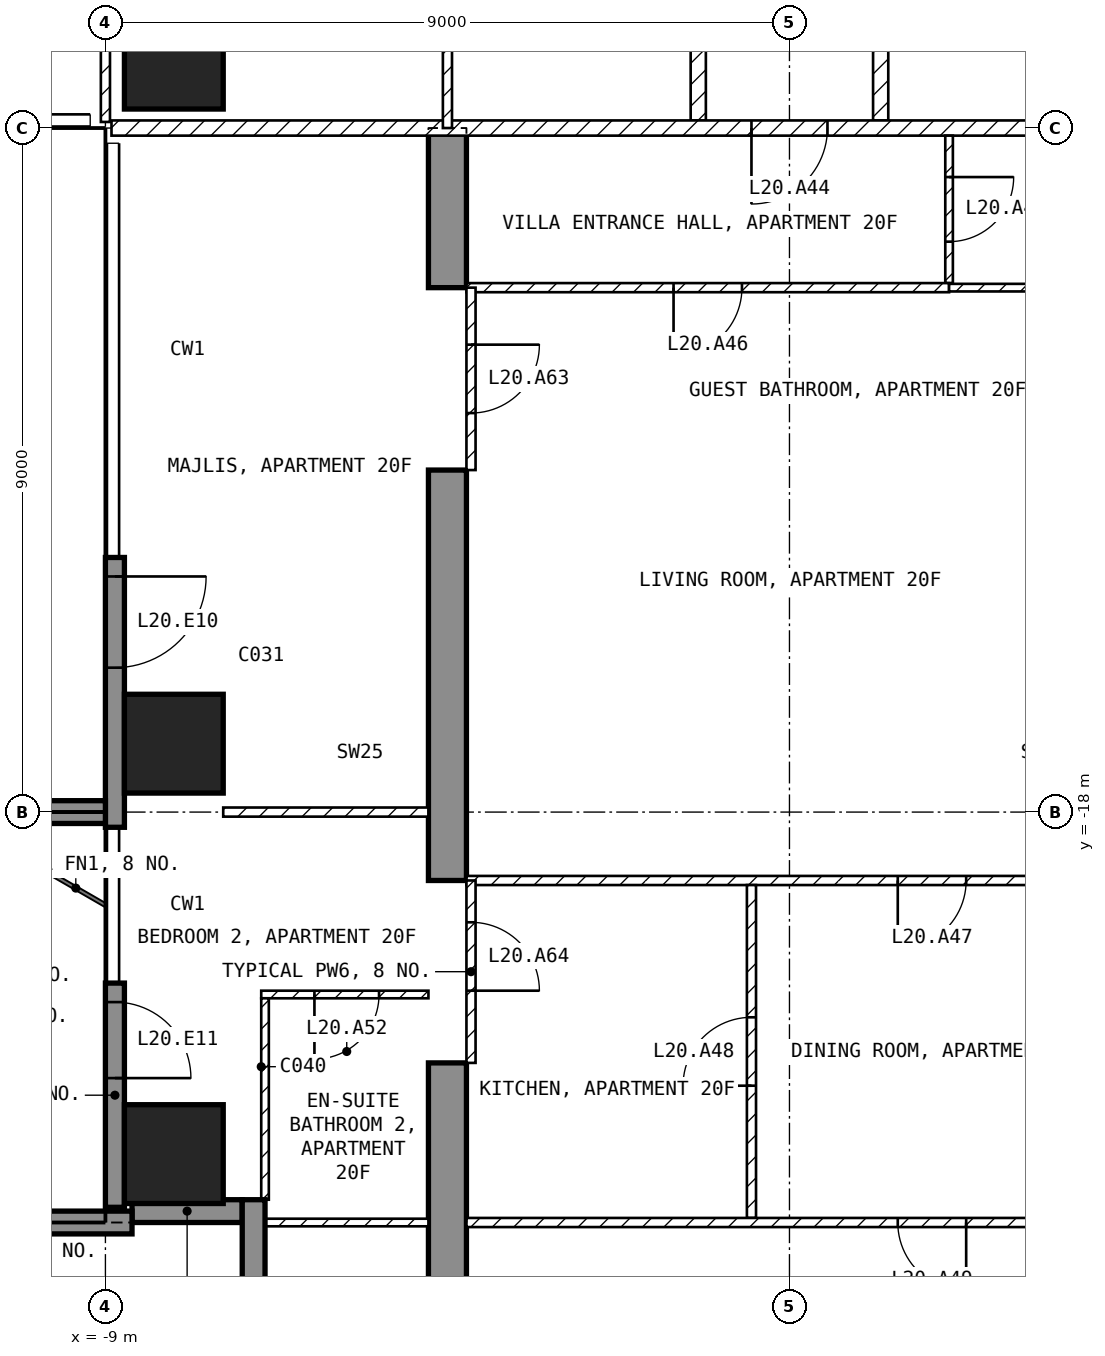
"""IFC4 building model, lengths in metres.
Left out: names, types, materials, properties, quantities, classifications, styles, units other than length and angle.
Written with IfcOpenShell. Run it as: python <this file> out.ifc"""

import sys

from ifc_helpers import new_model, si_unit, direction, frame, frame_2d, origin, origin_2d, place, context, subcontext, project, spatial, polyline, rectangle, outline, extrude, element, fill, save


model = new_model("IFC4")
c1 = context("Model", 3, precision=1e-05, world=origin(), true_north=direction((0.0, 1.0)))
c2 = subcontext(c1, "Body", "Model", "MODEL_VIEW")
j1 = project(units=[si_unit("LENGTHUNIT", "METRE"), si_unit("PLANEANGLEUNIT", "RADIAN")], contexts=[c1])
p1 = place(None, origin())
s1 = spatial("IfcSite", under=j1, at=p1, CompositionType="ELEMENT")
p2 = place(p1, origin())
s2 = spatial("IfcBuilding", under=s1, at=p2, CompositionType="ELEMENT")
p3 = place(p2, frame((0.0, 0.0, 89.0)))
s3 = spatial("IfcBuildingStorey", under=s2, at=p3, CompositionType="ELEMENT", Elevation=89.0)
for number, where, z_axis, x_axis in (
    (1, (-8.1, -22.5, -0.25), (0.0, 0.0, 1.0), (1.0, 0.0, 0.0)),
    (2, (-8.1, -17.1, -0.25), (0.0, 0.0, 1.0), (1.0, 0.0, 0.0)),
    (3, (-8.1, -8.1, -0.25), (0.0, 0.0, 1.0), (1.0, 0.0, 0.0)),
):
    element("IfcColumn", number, at=place(p3, frame(where, z_axis=z_axis, x_axis=x_axis)), inside=s3, PredefinedType="COLUMN", context=c2, shape_type="SweptSolid", body=[
        extrude(rectangle(XDim=1.3, YDim=1.3, at=origin_2d()), origin(), (0.0, 0.0, 1.0), 3.45),
    ])
p4 = place(p3, frame((-4.75, -25.45, -0.25), z_axis=(1.0, 0.0, 0.0), x_axis=(0.0, 1.0, 0.0)))
e4 = element("IfcWall", 4, at=p4, inside=s3, PredefinedType="SHEAR", context=c2, shape_type="SweptSolid", body=[
    extrude(outline(polyline([(0.0, 0.0), (4.15, 0.0), (4.15, 2.65), (6.55, 2.65), (6.55, 0.0), (11.95, 0.0), (11.95, 2.65), (14.35, 2.65), (14.35, 0.0), (16.45, 0.0), (16.45, 3.45), (0.0, 3.45), (0.0, 0.0)])), origin(), (0.0, 0.0, 1.0), 0.5),
])
p5 = place(p3, frame((-8.875, -14.65, 0.0), z_axis=(0.0, 0.0, 1.0), x_axis=(0.0, -1.0, 0.0)))
e5 = element("IfcWall", 5, at=p5, inside=s3, PredefinedType="SOLIDWALL", context=c2, shape_type="SweptSolid", body=[
    extrude(rectangle(XDim=3.55, YDim=0.25, at=frame_2d((1.775, 0.0))), origin(), (0.0, 0.0, 1.0), 3.2),
])
p6 = place(p5, frame((0.25, 0.0, 0.0)))
e6 = element("IfcOpeningElement", 6, at=p6, cuts=e5, PredefinedType="OPENING", context=c2, shape_type="SweptSolid", body=[
    extrude(rectangle(XDim=1.2, YDim=2.4, at=frame_2d((0.6, 1.2))), frame((0.0, 0.135, 0.0), z_axis=(0.0, -1.0, 0.0), x_axis=(1.0, 0.0, 0.0)), (0.0, 0.0, 1.0), 0.27),
])
p7 = place(p3, frame((-8.875, -20.25, 0.0), z_axis=(0.0, 0.0, 1.0), x_axis=(0.0, -1.0, 0.0)))
e7 = element("IfcWall", 7, at=p7, inside=s3, PredefinedType="SOLIDWALL", context=c2, shape_type="SweptSolid", body=[
    extrude(rectangle(XDim=2.95, YDim=0.25, at=frame_2d((1.475, 0.0))), origin(), (0.0, 0.0, 1.0), 3.2),
])
p8 = place(p7, frame((0.25, 0.0, 0.0)))
e8 = element("IfcOpeningElement", 8, at=p8, cuts=e7, PredefinedType="OPENING", context=c2, shape_type="SweptSolid", body=[
    extrude(rectangle(XDim=1.0, YDim=2.4, at=frame_2d((0.5, 1.2))), frame((0.0, 0.135, 0.0), z_axis=(0.0, -1.0, 0.0), x_axis=(1.0, 0.0, 0.0)), (0.0, 0.0, 1.0), 0.27),
])
p9 = place(p3, frame((-8.65, -23.25, 0.0), z_axis=(0.0, 0.0, 1.0), x_axis=(1.0, 0.0, 0.0)))
e9 = element("IfcWall", 9, at=p9, inside=s3, PredefinedType="SOLIDWALL", context=c2, shape_type="SweptSolid", body=[
    extrude(rectangle(XDim=1.45, YDim=0.3, at=frame_2d((0.725, 0.0))), origin(), (0.0, 0.0, 1.0), 3.2),
])
p10 = place(p3, frame((-7.05, -23.1, 0.0), z_axis=(0.0, 0.0, 1.0), x_axis=(0.0, -1.0, 0.0)))
e10 = element("IfcWall", 10, at=p10, inside=s3, PredefinedType="SOLIDWALL", context=c2, shape_type="SweptSolid", body=[
    extrude(rectangle(XDim=1.8, YDim=0.3, at=frame_2d((0.9, 0.0))), origin(), (0.0, 0.0, 1.0), 3.2),
])
p11 = place(p3, frame((-8.65, -23.4, 0.0), z_axis=(0.0, 0.0, 1.0), x_axis=(-1.0, 0.0, 0.0)))
e11 = element("IfcWall", 11, at=p11, inside=s3, PredefinedType="SOLIDWALL", context=c2, shape_type="SweptSolid", body=[
    extrude(rectangle(XDim=3.05, YDim=0.3, at=frame_2d((1.525, 0.0))), origin(), (0.0, 0.0, 1.0), 3.2),
])
p12 = place(p3, frame((-9.0, -18.0, 0.0), z_axis=(0.0, 0.0, 1.0), x_axis=(-1.0, 0.0, 0.0)))
e12 = element("IfcWall", 12, at=p12, inside=s3, PredefinedType="SOLIDWALL", context=c2, shape_type="SweptSolid", body=[
    extrude(rectangle(XDim=2.7, YDim=0.3, at=frame_2d((1.35, 0.0))), origin(), (0.0, 0.0, 1.0), 3.2),
])
for number, where, z_axis, x_axis in (
    (13, (1.2, -1.3, 0.0), (0.0, 0.0, 1.0), (0.0, -1.0, 0.0)),
    (14, (-1.2, -8.9, 0.0), (0.0, 0.0, 1.0), (0.0, 1.0, 0.0)),
):
    element("IfcWall", number, at=place(p3, frame(where, z_axis=z_axis, x_axis=x_axis)), inside=s3, PredefinedType="PARTITIONING", context=c2, shape_type="SweptSolid", body=[
        extrude(rectangle(XDim=7.6, YDim=0.2, at=frame_2d((3.8, 0.0))), origin(), (0.0, 0.0, 1.0), 3.2),
    ])
p13 = place(p3, frame((8.92, -9.0, 0.0), z_axis=(0.0, 0.0, 1.0), x_axis=(-1.0, 0.0, 0.0)))
e15 = element("IfcWall", 15, at=p13, inside=s3, PredefinedType="PARTITIONING", context=c2, shape_type="SweptSolid", body=[
    extrude(rectangle(XDim=17.84, YDim=0.2, at=frame_2d((8.92, 0.0))), origin(), (0.0, 0.0, 1.0), 3.2),
])
p14 = place(p13, frame((8.42, 0.0, 0.0)))
e16 = element("IfcOpeningElement", 16, at=p14, cuts=e15, PredefinedType="OPENING", context=c2, shape_type="SweptSolid", body=[
    extrude(rectangle(XDim=1.0, YDim=2.1, at=frame_2d((0.5, 1.05))), frame((0.0, 0.11, 0.0), z_axis=(0.0, -1.0, 0.0), x_axis=(1.0, 0.0, 0.0)), (0.0, 0.0, 1.0), 0.22),
])
p15 = place(p3, frame((-9.0, -1.3, 0.0), z_axis=(0.0, 0.0, 1.0), x_axis=(0.0, -1.0, 0.0)))
e17 = element("IfcWall", 17, at=p15, inside=s3, PredefinedType="PARTITIONING", context=c2, shape_type="SweptSolid", body=[
    extrude(rectangle(XDim=7.62, YDim=0.12, at=frame_2d((3.81, 0.0))), origin(), (0.0, 0.0, 1.0), 3.2),
])
p16 = place(p15, frame((4.17, 0.0, 0.0)))
e18 = element("IfcOpeningElement", 18, at=p16, cuts=e17, PredefinedType="OPENING", context=c2, shape_type="SweptSolid", body=[
    extrude(rectangle(XDim=0.9, YDim=2.1, at=frame_2d((0.45, 1.05))), frame((0.0, 0.07, 0.0), z_axis=(0.0, -1.0, 0.0), x_axis=(1.0, 0.0, 0.0)), (0.0, 0.0, 1.0), 0.14),
])
p17 = place(p3, frame((-4.5, -1.3, 0.0), z_axis=(0.0, 0.0, 1.0), x_axis=(0.0, -1.0, 0.0)))
e19 = element("IfcWall", 19, at=p17, inside=s3, PredefinedType="PARTITIONING", context=c2, shape_type="SweptSolid", body=[
    extrude(rectangle(XDim=7.7, YDim=0.12, at=frame_2d((3.85, 0.0))), origin(), (0.0, 0.0, 1.0), 3.2),
])
p18 = place(p17, frame((4.988, 0.0, 0.0)))
e20 = element("IfcOpeningElement", 20, at=p18, cuts=e19, PredefinedType="OPENING", context=c2, shape_type="SweptSolid", body=[
    extrude(rectangle(XDim=0.9, YDim=2.1, at=frame_2d((0.45, 1.05))), frame((0.0, 0.07, 0.0), z_axis=(0.0, -1.0, 0.0), x_axis=(1.0, 0.0, 0.0)), (0.0, 0.0, 1.0), 0.14),
])
p19 = place(p3, frame((2.1, -9.1, 0.0), z_axis=(0.0, 0.0, 1.0), x_axis=(0.0, -1.0, 0.0)))
e21 = element("IfcWall", 21, at=p19, inside=s3, PredefinedType="PARTITIONING", context=c2, shape_type="SweptSolid", body=[
    extrude(rectangle(XDim=1.94, YDim=0.1, at=frame_2d((0.97, 0.0))), origin(), (0.0, 0.0, 1.0), 3.2),
])
p20 = place(p19, frame((0.545, 0.0, 0.0)))
e22 = element("IfcOpeningElement", 22, at=p20, cuts=e21, PredefinedType="OPENING", context=c2, shape_type="SweptSolid", body=[
    extrude(rectangle(XDim=0.85, YDim=2.1, at=frame_2d((0.425, 1.05))), frame((0.0, 0.06, 0.0), z_axis=(0.0, -1.0, 0.0), x_axis=(1.0, 0.0, 0.0)), (0.0, 0.0, 1.0), 0.12),
])
p21 = place(p3, frame((2.1, -11.1, 0.0), z_axis=(0.0, 0.0, 1.0), x_axis=(-1.0, 0.0, 0.0)))
e23 = element("IfcWall", 23, at=p21, inside=s3, PredefinedType="PARTITIONING", context=c2, shape_type="SweptSolid", body=[
    extrude(rectangle(XDim=6.35, YDim=0.12, at=frame_2d((3.175, 0.0))), origin(), (0.0, 0.0, 1.0), 3.2),
])
p22 = place(p21, frame((2.725, 0.0, 0.0)))
e24 = element("IfcOpeningElement", 24, at=p22, cuts=e23, PredefinedType="OPENING", context=c2, shape_type="SweptSolid", body=[
    extrude(rectangle(XDim=0.9, YDim=2.1, at=frame_2d((0.45, 1.05))), frame((0.0, 0.07, 0.0), z_axis=(0.0, -1.0, 0.0), x_axis=(1.0, 0.0, 0.0)), (0.0, 0.0, 1.0), 0.14),
])
p23 = place(p3, frame((4.25, -11.1, 0.0), z_axis=(0.0, 0.0, 1.0), x_axis=(-1.0, 0.0, 0.0)))
e25 = element("IfcWall", 25, at=p23, inside=s3, PredefinedType="PARTITIONING", context=c2, shape_type="SweptSolid", body=[
    extrude(rectangle(XDim=2.15, YDim=0.1, at=frame_2d((1.075, 0.0))), origin(), (0.0, 0.0, 1.0), 3.2),
])
p24 = place(p3, frame((4.25, -18.9, 0.0), z_axis=(0.0, 0.0, 1.0), x_axis=(-1.0, 0.0, 0.0)))
e26 = element("IfcWall", 26, at=p24, inside=s3, PredefinedType="PARTITIONING", context=c2, shape_type="SweptSolid", body=[
    extrude(rectangle(XDim=8.5, YDim=0.12, at=frame_2d((4.25, 0.0))), origin(), (0.0, 0.0, 1.0), 3.2),
])
p25 = place(p24, frame((1.925, 0.0, 0.0)))
e27 = element("IfcOpeningElement", 27, at=p25, cuts=e26, PredefinedType="OPENING", context=c2, shape_type="SweptSolid", body=[
    extrude(rectangle(XDim=0.9, YDim=2.1, at=frame_2d((0.45, 1.05))), frame((0.0, 0.07, 0.0), z_axis=(0.0, -1.0, 0.0), x_axis=(1.0, 0.0, 0.0)), (0.0, 0.0, 1.0), 0.14),
])
p26 = place(p3, frame((-0.5, -23.34, 0.0), z_axis=(0.0, 0.0, 1.0), x_axis=(0.0, 1.0, 0.0)))
e28 = element("IfcWall", 28, at=p26, inside=s3, PredefinedType="PARTITIONING", context=c2, shape_type="SweptSolid", body=[
    extrude(rectangle(XDim=4.38, YDim=0.12, at=frame_2d((2.19, 0.0))), origin(), (0.0, 0.0, 1.0), 3.2),
])
p27 = place(p26, frame((1.74, 0.0, 0.0)))
e29 = element("IfcOpeningElement", 29, at=p27, cuts=e28, PredefinedType="OPENING", context=c2, shape_type="SweptSolid", body=[
    extrude(rectangle(XDim=0.9, YDim=2.1, at=frame_2d((0.45, 1.05))), frame((0.0, 0.07, 0.0), z_axis=(0.0, -1.0, 0.0), x_axis=(1.0, 0.0, 0.0)), (0.0, 0.0, 1.0), 0.14),
])
p28 = place(p3, frame((4.25, -23.4, 0.0), z_axis=(0.0, 0.0, 1.0), x_axis=(-1.0, 0.0, 0.0)))
e30 = element("IfcWall", 30, at=p28, inside=s3, PredefinedType="PARTITIONING", context=c2, shape_type="SweptSolid", body=[
    extrude(rectangle(XDim=8.5, YDim=0.12, at=frame_2d((4.25, 0.0))), origin(), (0.0, 0.0, 1.0), 3.2),
])
p29 = place(p28, frame((1.925, 0.0, 0.0)))
e31 = element("IfcOpeningElement", 31, at=p29, cuts=e30, PredefinedType="OPENING", context=c2, shape_type="SweptSolid", body=[
    extrude(rectangle(XDim=0.9, YDim=2.1, at=frame_2d((0.45, 1.05))), frame((0.0, 0.07, 0.0), z_axis=(0.0, -1.0, 0.0), x_axis=(1.0, 0.0, 0.0)), (0.0, 0.0, 1.0), 0.14),
])
p30 = place(p3, frame((-4.75, -18.0, 0.0), z_axis=(0.0, 0.0, 1.0), x_axis=(-1.0, 0.0, 0.0)))
e32 = element("IfcWall", 32, at=p30, inside=s3, PredefinedType="PARTITIONING", context=c2, shape_type="SweptSolid", body=[
    extrude(rectangle(XDim=2.7, YDim=0.12, at=frame_2d((1.35, 0.0))), origin(), (0.0, 0.0, 1.0), 3.2),
])
p31 = place(p3, frame((-4.75, -20.4, 0.0), z_axis=(0.0, 0.0, 1.0), x_axis=(-1.0, 0.0, 0.0)))
e33 = element("IfcWall", 33, at=p31, inside=s3, PredefinedType="PARTITIONING", context=c2, shape_type="SweptSolid", body=[
    extrude(rectangle(XDim=2.2, YDim=0.1, at=frame_2d((1.1, 0.0))), origin(), (0.0, 0.0, 1.0), 3.2),
])
p32 = place(p31, frame((0.65, 0.0, 0.0)))
e34 = element("IfcOpeningElement", 34, at=p32, cuts=e33, PredefinedType="OPENING", context=c2, shape_type="SweptSolid", body=[
    extrude(rectangle(XDim=0.85, YDim=2.1, at=frame_2d((0.425, 1.05))), frame((0.0, 0.06, 0.0), z_axis=(0.0, -1.0, 0.0), x_axis=(1.0, 0.0, 0.0)), (0.0, 0.0, 1.0), 0.12),
])
p33 = place(p3, frame((-6.9, -20.45, 0.0), z_axis=(0.0, 0.0, 1.0), x_axis=(0.0, -1.0, 0.0)))
e35 = element("IfcWall", 35, at=p33, inside=s3, PredefinedType="PARTITIONING", context=c2, shape_type="SweptSolid", body=[
    extrude(rectangle(XDim=2.65, YDim=0.1, at=frame_2d((1.325, 0.0))), origin(), (0.0, 0.0, 1.0), 3.2),
])
p34 = place(p3, frame((-4.75, -23.4, 0.0), z_axis=(0.0, 0.0, 1.0), x_axis=(-1.0, 0.0, 0.0)))
e36 = element("IfcWall", 36, at=p34, inside=s3, PredefinedType="PARTITIONING", context=c2, shape_type="SweptSolid", body=[
    extrude(rectangle(XDim=2.37, YDim=0.1, at=frame_2d((1.185, 0.0))), origin(), (0.0, 0.0, 1.0), 3.2),
])
p35 = place(p3, frame((-4.19, -11.1, 0.0), z_axis=(0.0, 0.0, 1.0), x_axis=(0.0, -1.0, 0.0)))
e37 = element("IfcWall", 37, at=p35, inside=s3, PredefinedType="PARTITIONING", context=c2, shape_type="SweptSolid", body=[
    extrude(rectangle(XDim=2.4, YDim=0.12, at=frame_2d((1.2, 0.0))), origin(), (0.0, 0.0, 1.0), 2.4),
])
p36 = place(p35, frame((0.75, 0.0, 0.0)))
e38 = element("IfcOpeningElement", 38, at=p36, cuts=e37, PredefinedType="OPENING", context=c2, shape_type="SweptSolid", body=[
    extrude(rectangle(XDim=0.9, YDim=2.1, at=frame_2d((0.45, 1.05))), frame((0.0, 0.07, 0.0), z_axis=(0.0, -1.0, 0.0), x_axis=(1.0, 0.0, 0.0)), (0.0, 0.0, 1.0), 0.14),
])
p37 = place(p3, frame((-4.19, -18.9, 0.0), z_axis=(0.0, 0.0, 1.0), x_axis=(0.0, -1.0, 0.0)))
e39 = element("IfcWall", 39, at=p37, inside=s3, PredefinedType="PARTITIONING", context=c2, shape_type="SweptSolid", body=[
    extrude(rectangle(XDim=2.4, YDim=0.12, at=frame_2d((1.2, 0.0))), origin(), (0.0, 0.0, 1.0), 2.4),
])
p38 = place(p37, frame((0.55, 0.0, 0.0)))
e40 = element("IfcOpeningElement", 40, at=p38, cuts=e39, PredefinedType="OPENING", context=c2, shape_type="SweptSolid", body=[
    extrude(rectangle(XDim=0.9, YDim=2.1, at=frame_2d((0.45, 1.05))), frame((0.0, 0.07, 0.0), z_axis=(0.0, -1.0, 0.0), x_axis=(1.0, 0.0, 0.0)), (0.0, 0.0, 1.0), 0.14),
])
p39 = place(p6, origin())
e41 = element("IfcDoor", 41, at=p39, inside=s3, OperationType="SINGLE_SWING_LEFT", PredefinedType="DOOR", context=c2, shape_type="SweptSolid", body=[
    extrude(rectangle(XDim=1.2, YDim=2.4, at=frame_2d((0.6, 1.2))), frame((0.0, 0.025, 0.0), z_axis=(0.0, -1.0, 0.0), x_axis=(1.0, 0.0, 0.0)), (0.0, 0.0, 1.0), 0.05),
])
fill(e6, e41)
p40 = place(p8, origin())
e42 = element("IfcDoor", 42, at=p40, inside=s3, OperationType="SINGLE_SWING_RIGHT", PredefinedType="DOOR", context=c2, shape_type="SweptSolid", body=[
    extrude(rectangle(XDim=1.0, YDim=2.4, at=frame_2d((0.5, 1.2))), frame((0.0, 0.025, 0.0), z_axis=(0.0, -1.0, 0.0), x_axis=(1.0, 0.0, 0.0)), (0.0, 0.0, 1.0), 0.05),
])
fill(e8, e42)
p41 = place(p14, origin())
e43 = element("IfcDoor", 43, at=p41, inside=s3, OperationType="SINGLE_SWING_RIGHT", PredefinedType="DOOR", context=c2, shape_type="SweptSolid", body=[
    extrude(rectangle(XDim=1.0, YDim=2.1, at=frame_2d((0.5, 1.05))), frame((0.0, 0.025, 0.0), z_axis=(0.0, -1.0, 0.0), x_axis=(1.0, 0.0, 0.0)), (0.0, 0.0, 1.0), 0.05),
])
fill(e16, e43)
p42 = place(p20, origin())
e44 = element("IfcDoor", 44, at=p42, inside=s3, OperationType="SINGLE_SWING_LEFT", PredefinedType="DOOR", context=c2, shape_type="SweptSolid", body=[
    extrude(rectangle(XDim=0.85, YDim=2.1, at=frame_2d((0.425, 1.05))), frame((0.0, 0.025, 0.0), z_axis=(0.0, -1.0, 0.0), x_axis=(1.0, 0.0, 0.0)), (0.0, 0.0, 1.0), 0.05),
])
fill(e22, e44)
p43 = place(p22, origin())
e45 = element("IfcDoor", 45, at=p43, inside=s3, OperationType="SINGLE_SWING_RIGHT", PredefinedType="DOOR", context=c2, shape_type="SweptSolid", body=[
    extrude(rectangle(XDim=0.9, YDim=2.1, at=frame_2d((0.45, 1.05))), frame((0.0, 0.025, 0.0), z_axis=(0.0, -1.0, 0.0), x_axis=(1.0, 0.0, 0.0)), (0.0, 0.0, 1.0), 0.05),
])
fill(e24, e45)
p44 = place(p25, origin())
e46 = element("IfcDoor", 46, at=p44, inside=s3, OperationType="SINGLE_SWING_RIGHT", PredefinedType="DOOR", context=c2, shape_type="SweptSolid", body=[
    extrude(rectangle(XDim=0.9, YDim=2.1, at=frame_2d((0.45, 1.05))), frame((0.0, 0.025, 0.0), z_axis=(0.0, -1.0, 0.0), x_axis=(1.0, 0.0, 0.0)), (0.0, 0.0, 1.0), 0.05),
])
fill(e27, e46)
p45 = place(p27, origin())
e47 = element("IfcDoor", 47, at=p45, inside=s3, OperationType="SINGLE_SWING_LEFT", PredefinedType="DOOR", context=c2, shape_type="SweptSolid", body=[
    extrude(rectangle(XDim=0.9, YDim=2.1, at=frame_2d((0.45, 1.05))), frame((0.0, 0.025, 0.0), z_axis=(0.0, -1.0, 0.0), x_axis=(1.0, 0.0, 0.0)), (0.0, 0.0, 1.0), 0.05),
])
fill(e29, e47)
p46 = place(p29, origin())
e48 = element("IfcDoor", 48, at=p46, inside=s3, OperationType="SINGLE_SWING_LEFT", PredefinedType="DOOR", context=c2, shape_type="SweptSolid", body=[
    extrude(rectangle(XDim=0.9, YDim=2.1, at=frame_2d((0.45, 1.05))), frame((0.0, 0.025, 0.0), z_axis=(0.0, -1.0, 0.0), x_axis=(1.0, 0.0, 0.0)), (0.0, 0.0, 1.0), 0.05),
])
fill(e31, e48)
p47 = place(p32, origin())
e49 = element("IfcDoor", 49, at=p47, inside=s3, OperationType="SINGLE_SWING_RIGHT", PredefinedType="DOOR", context=c2, shape_type="SweptSolid", body=[
    extrude(rectangle(XDim=0.85, YDim=2.1, at=frame_2d((0.425, 1.05))), frame((0.0, 0.025, 0.0), z_axis=(0.0, -1.0, 0.0), x_axis=(1.0, 0.0, 0.0)), (0.0, 0.0, 1.0), 0.05),
])
fill(e34, e49)
p48 = place(p36, origin())
e50 = element("IfcDoor", 50, at=p48, inside=s3, OperationType="SINGLE_SWING_LEFT", PredefinedType="DOOR", context=c2, shape_type="SweptSolid", body=[
    extrude(rectangle(XDim=0.9, YDim=2.1, at=frame_2d((0.45, 1.05))), frame((0.0, 0.025, 0.0), z_axis=(0.0, -1.0, 0.0), x_axis=(1.0, 0.0, 0.0)), (0.0, 0.0, 1.0), 0.05),
])
fill(e38, e50)
p49 = place(p38, origin())
e51 = element("IfcDoor", 51, at=p49, inside=s3, OperationType="SINGLE_SWING_RIGHT", PredefinedType="DOOR", context=c2, shape_type="SweptSolid", body=[
    extrude(rectangle(XDim=0.9, YDim=2.1, at=frame_2d((0.45, 1.05))), frame((0.0, 0.025, 0.0), z_axis=(0.0, -1.0, 0.0), x_axis=(1.0, 0.0, 0.0)), (0.0, 0.0, 1.0), 0.05),
])
fill(e40, e51)
save(model, sys.argv[1])
